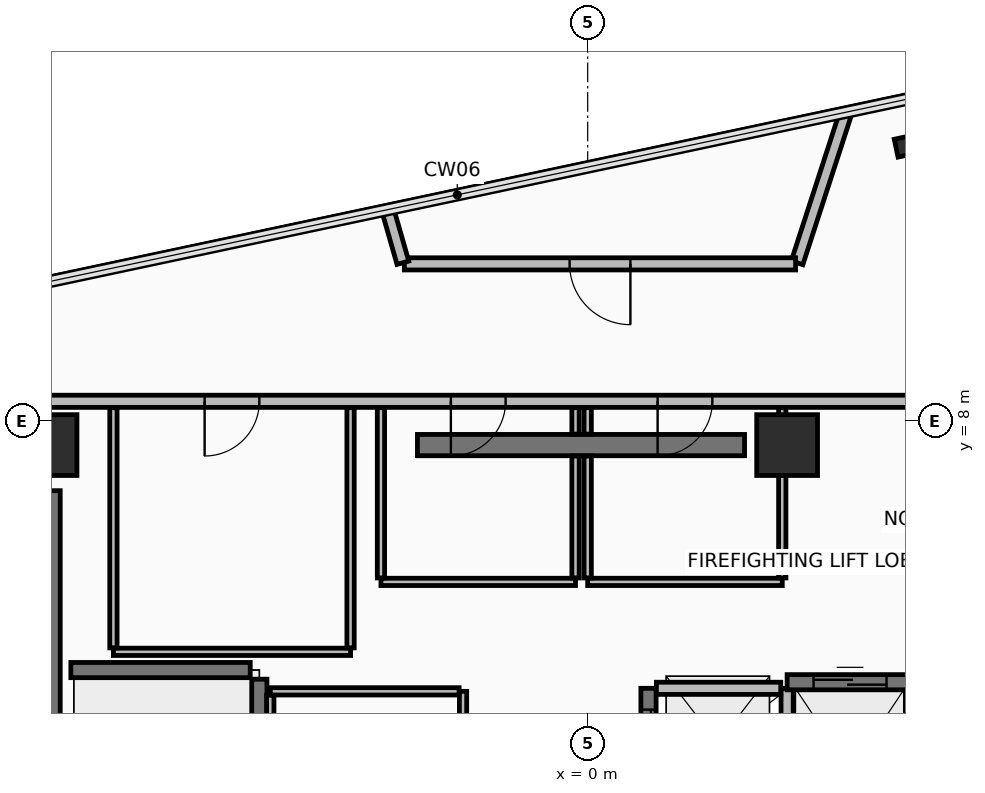
"""IFC4 building model, lengths in metres.
Left out: names, types, materials, properties, quantities, classifications, styles, units other than length and angle.
Written with IfcOpenShell. Run it as: python <this file> out.ifc"""

import sys

from ifc_helpers import new_model, si_unit, direction, frame, frame_2d, origin, origin_2d, place, context, subcontext, project, spatial, rectangle, hollow_rectangle, extrude, element, fill, save


model = new_model("IFC4")
c1 = context("Model", 3, precision=1e-05, world=origin(), true_north=direction((0.0, 1.0)))
c2 = subcontext(c1, "Body", "Model", "MODEL_VIEW")
j1 = project(units=[si_unit("LENGTHUNIT", "METRE"), si_unit("PLANEANGLEUNIT", "RADIAN")], contexts=[c1])
p1 = place(None, origin())
s1 = spatial("IfcSite", under=j1, at=p1, CompositionType="ELEMENT")
p2 = place(p1, origin())
s2 = spatial("IfcBuilding", under=s1, at=p2, CompositionType="ELEMENT")
p3 = place(p2, frame((0.0, 0.0, 302.15)))
s3 = spatial("IfcBuildingStorey", under=s2, at=p3, CompositionType="ELEMENT", Elevation=302.15)
for number, where, z_axis, x_axis in (
    (1, (3.28, 7.6, 0.0), (0.0, 0.0, 1.0), (1.0, 0.0, 0.0)),
    (2, (-8.9, 7.6, 0.0), (0.0, 0.0, 1.0), (1.0, 0.0, 0.0)),
):
    element("IfcColumn", number, at=place(p3, frame(where, z_axis=z_axis, x_axis=x_axis)), inside=s3, PredefinedType="COLUMN", context=c2, shape_type="SweptSolid", body=[
        extrude(rectangle(XDim=1.0, YDim=1.0, at=origin_2d()), origin(), (0.0, 0.0, 1.0), 4.15),
    ])
p4 = place(p3, frame((5.22, 12.514, 0.0), z_axis=(0.0, 0.0, 1.0), x_axis=(0.978147237858, 0.207913398007, 0.0)))
e3 = element("IfcColumn", 3, at=p4, inside=s3, PredefinedType="COLUMN", context=c2, shape_type="SweptSolid", body=[
    extrude(hollow_rectangle(XDim=0.3, YDim=0.3, WallThickness=0.02, at=origin_2d()), origin(), (0.0, 0.0, 1.0), 4.15),
])
p5 = place(p3, frame((-2.8, 7.6, 0.0), z_axis=(0.0, 0.0, 1.0), x_axis=(1.0, 0.0, 0.0)))
e4 = element("IfcWall", 4, at=p5, inside=s3, PredefinedType="SHEAR", context=c2, shape_type="SweptSolid", body=[
    extrude(rectangle(XDim=5.38, YDim=0.35, at=frame_2d((2.69, 0.0))), origin(), (0.0, 0.0, 1.0), 3.95),
])
p6 = place(p3, frame((-8.9, -3.85, 0.0), z_axis=(0.0, 0.0, 1.0), x_axis=(0.0, 1.0, 0.0)))
e5 = element("IfcWall", 5, at=p6, inside=s3, PredefinedType="SHEAR", context=c2, shape_type="SweptSolid", body=[
    extrude(rectangle(XDim=10.7, YDim=0.45, at=frame_2d((5.35, 0.0))), origin(), (0.0, 0.0, 1.0), 3.95),
])
p7 = place(p3, frame((9.62, 8.32, 0.0), z_axis=(0.0, 0.0, 1.0), x_axis=(-1.0, 0.0, 0.0)))
e6 = element("IfcWall", 6, at=p7, inside=s3, PredefinedType="PARTITIONING", context=c2, shape_type="SweptSolid", body=[
    extrude(rectangle(XDim=19.24, YDim=0.2, at=frame_2d((9.62, 0.0))), origin(), (0.0, 0.0, 1.0), 3.445),
])
p8 = place(p7, frame((10.97, 0.0, 0.0)))
e7 = element("IfcOpeningElement", 7, at=p8, cuts=e6, PredefinedType="OPENING", context=c2, shape_type="SweptSolid", body=[
    extrude(rectangle(XDim=0.9, YDim=2.1, at=frame_2d((0.45, 1.05))), frame((0.0, 0.11, 0.0), z_axis=(0.0, -1.0, 0.0), x_axis=(1.0, 0.0, 0.0)), (0.0, 0.0, 1.0), 0.22),
])
p9 = place(p7, frame((7.57, 0.0, 0.0)))
e8 = element("IfcOpeningElement", 8, at=p9, cuts=e6, PredefinedType="OPENING", context=c2, shape_type="SweptSolid", body=[
    extrude(rectangle(XDim=0.9, YDim=2.1, at=frame_2d((0.45, 1.05))), frame((0.0, 0.11, 0.0), z_axis=(0.0, -1.0, 0.0), x_axis=(1.0, 0.0, 0.0)), (0.0, 0.0, 1.0), 0.22),
])
p10 = place(p7, frame((15.02, 0.0, 0.0)))
e9 = element("IfcOpeningElement", 9, at=p10, cuts=e6, PredefinedType="OPENING", context=c2, shape_type="SweptSolid", body=[
    extrude(rectangle(XDim=0.9, YDim=2.1, at=frame_2d((0.45, 1.05))), frame((0.0, 0.11, 0.0), z_axis=(0.0, -1.0, 0.0), x_axis=(1.0, 0.0, 0.0)), (0.0, 0.0, 1.0), 0.22),
])
p11 = place(p3, frame((-5.4, -3.55, 0.0), z_axis=(0.0, 0.0, 1.0), x_axis=(0.0, 1.0, 0.0)))
e10 = element("IfcWall", 10, at=p11, inside=s3, PredefinedType="SHEAR", context=c2, shape_type="SweptSolid", body=[
    extrude(rectangle(XDim=7.3, YDim=0.25, at=frame_2d((3.65, 0.0))), origin(), (0.0, 0.0, 1.0), 3.95),
])
p12 = place(p3, frame((-8.5, 3.9, 0.0), z_axis=(0.0, 0.0, 1.0), x_axis=(1.0, 0.0, 0.0)))
e11 = element("IfcWall", 11, at=p12, inside=s3, PredefinedType="SHEAR", context=c2, shape_type="SweptSolid", body=[
    extrude(rectangle(XDim=2.95, YDim=0.25, at=frame_2d((1.475, 0.0))), origin(), (0.0, 0.0, 1.0), 3.95),
])
p13 = place(p3, frame((5.35, -3.75, 0.0), z_axis=(0.0, 0.0, 1.0), x_axis=(0.0, 1.0, 0.0)))
e12 = element("IfcWall", 12, at=p13, inside=s3, PredefinedType="SHEAR", context=c2, shape_type="SweptSolid", body=[
    extrude(rectangle(XDim=7.3, YDim=0.25, at=frame_2d((3.65, 0.0))), origin(), (0.0, 0.0, 1.0), 3.95),
])
p14 = place(p3, frame((1.0, 1.8, 0.0), z_axis=(0.0, 0.0, 1.0), x_axis=(0.0, 1.0, 0.0)))
e13 = element("IfcWall", 13, at=p14, inside=s3, PredefinedType="SHEAR", context=c2, shape_type="SweptSolid", body=[
    extrude(rectangle(XDim=1.8, YDim=0.25, at=frame_2d((0.9, 0.0))), origin(), (0.0, 0.0, 1.0), 3.95),
])
p15 = place(p14, frame((0.35, 0.0, 0.0)))
e14 = element("IfcOpeningElement", 14, at=p15, cuts=e13, PredefinedType="OPENING", context=c2, shape_type="SweptSolid", body=[
    extrude(rectangle(XDim=1.1, YDim=2.2, at=frame_2d((0.55, 1.1))), frame((0.0, 0.135, 0.0), z_axis=(0.0, -1.0, 0.0), x_axis=(1.0, 0.0, 0.0)), (0.0, 0.0, 1.0), 0.27),
])
p16 = place(p3, frame((3.28, 1.8, 0.0), z_axis=(0.0, 0.0, 1.0), x_axis=(0.0, 1.0, 0.0)))
e15 = element("IfcWall", 15, at=p16, inside=s3, PredefinedType="PARTITIONING", context=c2, shape_type="SweptSolid", body=[
    extrude(rectangle(XDim=1.8, YDim=0.2, at=frame_2d((0.9, 0.0))), origin(), (0.0, 0.0, 1.0), 3.95),
])
p17 = place(p3, frame((1.13, 3.6, 0.0), z_axis=(0.0, 0.0, 1.0), x_axis=(1.0, 0.0, 0.0)))
e16 = element("IfcWall", 16, at=p17, inside=s3, PredefinedType="PARTITIONING", context=c2, shape_type="SweptSolid", body=[
    extrude(rectangle(XDim=2.045, YDim=0.2, at=frame_2d((1.022, 0.0))), origin(), (0.0, 0.0, 1.0), 3.245),
])
p18 = place(p3, frame((3.28, 3.7, 0.0), z_axis=(0.0, 0.0, 1.0), x_axis=(1.0, 0.0, 0.0)))
e17 = element("IfcWall", 17, at=p18, inside=s3, PredefinedType="SHEAR", context=c2, shape_type="SweptSolid", body=[
    extrude(rectangle(XDim=2.07, YDim=0.25, at=frame_2d((1.035, 0.0))), origin(), (0.0, 0.0, 1.0), 3.95),
])
p19 = place(p18, frame((0.435, 0.0, 0.0)))
e18 = element("IfcOpeningElement", 18, at=p19, cuts=e17, PredefinedType="OPENING", context=c2, shape_type="SweptSolid", body=[
    extrude(rectangle(XDim=1.2, YDim=2.2, at=frame_2d((0.6, 1.1))), frame((0.0, 0.135, 0.0), z_axis=(0.0, -1.0, 0.0), x_axis=(1.0, 0.0, 0.0)), (0.0, 0.0, 1.0), 0.27),
])
p20 = place(p3, frame((-2.05, 0.515, 0.0), z_axis=(0.0, 0.0, 1.0), x_axis=(0.0, 1.0, 0.0)))
e19 = element("IfcWall", 19, at=p20, inside=s3, PredefinedType="PARTITIONING", context=c2, shape_type="SweptSolid", body=[
    extrude(rectangle(XDim=3.035, YDim=0.12, at=frame_2d((1.518, 0.0))), origin(), (0.0, 0.0, 1.0), 3.95),
])
p21 = place(p20, frame((1.092, 0.0, 0.0)))
e20 = element("IfcOpeningElement", 20, at=p21, cuts=e19, PredefinedType="OPENING", context=c2, shape_type="SweptSolid", body=[
    extrude(rectangle(XDim=0.85, YDim=2.1, at=frame_2d((0.425, 1.05))), frame((0.0, 0.07, 0.0), z_axis=(0.0, -1.0, 0.0), x_axis=(1.0, 0.0, 0.0)), (0.0, 0.0, 1.0), 0.14),
])
p22 = place(p3, frame((-2.115, 3.55, 0.0), z_axis=(0.0, 0.0, 1.0), x_axis=(-1.0, 0.0, 0.0)))
e21 = element("IfcWall", 21, at=p22, inside=s3, PredefinedType="PARTITIONING", context=c2, shape_type="SweptSolid", body=[
    extrude(rectangle(XDim=3.105, YDim=0.12, at=frame_2d((1.552, 0.0))), origin(), (0.0, 0.0, 1.0), 3.95),
])
p23 = place(p3, frame((-5.22, 3.485, 0.0), z_axis=(0.0, 0.0, 1.0), x_axis=(0.0, -1.0, 0.0)))
e22 = element("IfcWall", 22, at=p23, inside=s3, PredefinedType="PARTITIONING", context=c2, shape_type="SweptSolid", body=[
    extrude(rectangle(XDim=2.97, YDim=0.12, at=frame_2d((1.485, 0.0))), origin(), (0.0, 0.0, 1.0), 3.95),
])
p24 = place(p3, frame((-3.4, 5.35, 0.0), z_axis=(0.0, 0.0, 1.0), x_axis=(1.0, 0.0, 0.0)))
e23 = element("IfcWall", 23, at=p24, inside=s3, PredefinedType="PARTITIONING", context=c2, shape_type="SweptSolid", body=[
    extrude(rectangle(XDim=3.2, YDim=0.12, at=frame_2d((1.6, 0.0))), origin(), (0.0, 0.0, 1.0), 3.95),
])
p25 = place(p3, frame((-0.2, 5.415, 0.0), z_axis=(0.0, 0.0, 1.0), x_axis=(0.0, 1.0, 0.0)))
e24 = element("IfcWall", 24, at=p25, inside=s3, PredefinedType="PARTITIONING", context=c2, shape_type="SweptSolid", body=[
    extrude(rectangle(XDim=2.005, YDim=0.12, at=frame_2d((1.002, 0.0))), origin(), (0.0, 0.0, 1.0), 3.245),
])
p26 = place(p3, frame((-0.2, 7.78, 0.0), z_axis=(0.0, 0.0, 1.0), x_axis=(0.0, 1.0, 0.0)))
e25 = element("IfcWall", 25, at=p26, inside=s3, PredefinedType="PARTITIONING", context=c2, shape_type="SweptSolid", body=[
    extrude(rectangle(XDim=0.435, YDim=0.12, at=frame_2d((0.218, 0.0))), origin(), (0.0, 0.0, 1.0), 3.245),
])
p27 = place(p3, frame((-3.4, 8.215, 0.0), z_axis=(0.0, 0.0, 1.0), x_axis=(0.0, -1.0, 0.0)))
e26 = element("IfcWall", 26, at=p27, inside=s3, PredefinedType="PARTITIONING", context=c2, shape_type="SweptSolid", body=[
    extrude(rectangle(XDim=2.8, YDim=0.12, at=frame_2d((1.4, 0.0))), origin(), (0.0, 0.0, 1.0), 3.245),
])
p28 = place(p3, frame((0.0, 5.35, 0.0), z_axis=(0.0, 0.0, 1.0), x_axis=(1.0, 0.0, 0.0)))
e27 = element("IfcWall", 27, at=p28, inside=s3, PredefinedType="PARTITIONING", context=c2, shape_type="SweptSolid", body=[
    extrude(rectangle(XDim=3.2, YDim=0.12, at=frame_2d((1.6, 0.0))), origin(), (0.0, 0.0, 1.0), 3.245),
])
p29 = place(p3, frame((3.2, 5.415, 0.0), z_axis=(0.0, 0.0, 1.0), x_axis=(0.0, 1.0, 0.0)))
e28 = element("IfcWall", 28, at=p29, inside=s3, PredefinedType="PARTITIONING", context=c2, shape_type="SweptSolid", body=[
    extrude(rectangle(XDim=2.8, YDim=0.12, at=frame_2d((1.4, 0.0))), origin(), (0.0, 0.0, 1.0), 3.245),
])
p30 = place(p3, frame((0.0, 8.215, 0.0), z_axis=(0.0, 0.0, 1.0), x_axis=(0.0, -1.0, 0.0)))
e29 = element("IfcWall", 29, at=p30, inside=s3, PredefinedType="PARTITIONING", context=c2, shape_type="SweptSolid", body=[
    extrude(rectangle(XDim=0.435, YDim=0.12, at=frame_2d((0.218, 0.0))), origin(), (0.0, 0.0, 1.0), 3.245),
])
p31 = place(p3, frame((0.0, 7.42, 0.0), z_axis=(0.0, 0.0, 1.0), x_axis=(0.0, -1.0, 0.0)))
e30 = element("IfcWall", 30, at=p31, inside=s3, PredefinedType="PARTITIONING", context=c2, shape_type="SweptSolid", body=[
    extrude(rectangle(XDim=2.005, YDim=0.12, at=frame_2d((1.002, 0.0))), origin(), (0.0, 0.0, 1.0), 3.245),
])
p32 = place(p3, frame((-7.8, 4.2, 0.0), z_axis=(0.0, 0.0, 1.0), x_axis=(1.0, 0.0, 0.0)))
e31 = element("IfcWall", 31, at=p32, inside=s3, PredefinedType="PARTITIONING", context=c2, shape_type="SweptSolid", body=[
    extrude(rectangle(XDim=3.9, YDim=0.12, at=frame_2d((1.95, 0.0))), origin(), (0.0, 0.0, 1.0), 3.95),
])
for number, where, z_axis, x_axis in (
    (32, (-3.9, 4.265, 0.0), (0.0, 0.0, 1.0), (0.0, 1.0, 0.0)),
    (33, (-7.8, 8.215, 0.0), (0.0, 0.0, 1.0), (0.0, -1.0, 0.0)),
):
    element("IfcWall", number, at=place(p3, frame(where, z_axis=z_axis, x_axis=x_axis)), inside=s3, PredefinedType="PARTITIONING", context=c2, shape_type="SweptSolid", body=[
        extrude(rectangle(XDim=3.95, YDim=0.12, at=frame_2d((1.975, 0.0))), origin(), (0.0, 0.0, 1.0), 3.245),
    ])
p33 = place(p3, frame((4.248, 13.074, 0.0), z_axis=(0.0, 0.0, 1.0), x_axis=(-0.309045789099, -0.95104715984, 0.0)))
e34 = element("IfcWall", 34, at=p33, inside=s3, PredefinedType="PARTITIONING", context=c2, shape_type="SweptSolid", body=[
    extrude(rectangle(XDim=2.604, YDim=0.2, at=frame_2d((1.302, 0.0))), origin(), (0.0, 0.0, 1.0), 3.295),
])
p34 = place(p3, frame((3.419, 10.58, 0.0), z_axis=(0.0, 0.0, 1.0), x_axis=(-1.0, 0.0, 0.0)))
e35 = element("IfcWall", 35, at=p34, inside=s3, PredefinedType="PARTITIONING", context=c2, shape_type="SweptSolid", body=[
    extrude(rectangle(XDim=6.434, YDim=0.2, at=frame_2d((3.217, 0.0))), origin(), (0.0, 0.0, 1.0), 3.295),
])
p35 = place(p34, frame((2.717, 0.0, 0.0)))
e36 = element("IfcOpeningElement", 36, at=p35, cuts=e35, PredefinedType="OPENING", context=c2, shape_type="SweptSolid", body=[
    extrude(rectangle(XDim=1.0, YDim=2.15, at=frame_2d((0.5, 1.075))), frame((0.0, 0.11, 0.0), z_axis=(0.0, -1.0, 0.0), x_axis=(1.0, 0.0, 0.0)), (0.0, 0.0, 1.0), 0.22),
])
p36 = place(p3, frame((-3.039, 10.598, 0.0), z_axis=(0.0, 0.0, 1.0), x_axis=(-0.275488971994, 0.961304231921, 0.0)))
e37 = element("IfcWall", 37, at=p36, inside=s3, PredefinedType="PARTITIONING", context=c2, shape_type="SweptSolid", body=[
    extrude(rectangle(XDim=0.882, YDim=0.2, at=frame_2d((0.441, 0.0))), origin(), (0.0, 0.0, 1.0), 3.295),
])
p37 = place(p15, origin())
e38 = element("IfcDoor", 38, at=p37, inside=s3, OperationType="SLIDING_TO_LEFT", PredefinedType="DOOR", context=c2, shape_type="SweptSolid", body=[
    extrude(rectangle(XDim=1.1, YDim=2.2, at=frame_2d((0.55, 1.1))), frame((0.0, 0.025, 0.0), z_axis=(0.0, -1.0, 0.0), x_axis=(1.0, 0.0, 0.0)), (0.0, 0.0, 1.0), 0.05),
])
fill(e14, e38)
p38 = place(p19, origin())
e39 = element("IfcDoor", 39, at=p38, inside=s3, OperationType="SLIDING_TO_RIGHT", PredefinedType="DOOR", context=c2, shape_type="SweptSolid", body=[
    extrude(rectangle(XDim=1.2, YDim=2.2, at=frame_2d((0.6, 1.1))), frame((0.0, 0.025, 0.0), z_axis=(0.0, -1.0, 0.0), x_axis=(1.0, 0.0, 0.0)), (0.0, 0.0, 1.0), 0.05),
])
fill(e18, e39)
p39 = place(p8, frame((0.9, 0.0, 0.0), z_axis=(0.0, 0.0, 1.0), x_axis=(-1.0, 0.0, 0.0)))
e40 = element("IfcDoor", 40, at=p39, inside=s3, OperationType="SINGLE_SWING_LEFT", PredefinedType="DOOR", context=c2, shape_type="SweptSolid", body=[
    extrude(rectangle(XDim=0.9, YDim=2.1, at=frame_2d((0.45, 1.05))), frame((0.0, 0.025, 0.0), z_axis=(0.0, -1.0, 0.0), x_axis=(1.0, 0.0, 0.0)), (0.0, 0.0, 1.0), 0.05),
])
fill(e7, e40)
p40 = place(p9, frame((0.9, 0.0, 0.0), z_axis=(0.0, 0.0, 1.0), x_axis=(-1.0, 0.0, 0.0)))
e41 = element("IfcDoor", 41, at=p40, inside=s3, OperationType="SINGLE_SWING_LEFT", PredefinedType="DOOR", context=c2, shape_type="SweptSolid", body=[
    extrude(rectangle(XDim=0.9, YDim=2.1, at=frame_2d((0.45, 1.05))), frame((0.0, 0.025, 0.0), z_axis=(0.0, -1.0, 0.0), x_axis=(1.0, 0.0, 0.0)), (0.0, 0.0, 1.0), 0.05),
])
fill(e8, e41)
p41 = place(p10, frame((0.9, 0.0, 0.0), z_axis=(0.0, 0.0, 1.0), x_axis=(-1.0, 0.0, 0.0)))
e42 = element("IfcDoor", 42, at=p41, inside=s3, OperationType="SINGLE_SWING_LEFT", PredefinedType="DOOR", context=c2, shape_type="SweptSolid", body=[
    extrude(rectangle(XDim=0.9, YDim=2.1, at=frame_2d((0.45, 1.05))), frame((0.0, 0.025, 0.0), z_axis=(0.0, -1.0, 0.0), x_axis=(1.0, 0.0, 0.0)), (0.0, 0.0, 1.0), 0.05),
])
fill(e9, e42)
p42 = place(p35, origin())
e43 = element("IfcDoor", 43, at=p42, inside=s3, OperationType="SINGLE_SWING_RIGHT", PredefinedType="DOOR", context=c2, shape_type="SweptSolid", body=[
    extrude(rectangle(XDim=1.0, YDim=2.15, at=frame_2d((0.5, 1.075))), frame((0.0, 0.025, 0.0), z_axis=(0.0, -1.0, 0.0), x_axis=(1.0, 0.0, 0.0)), (0.0, 0.0, 1.0), 0.05),
])
fill(e36, e43)
save(model, sys.argv[1])
